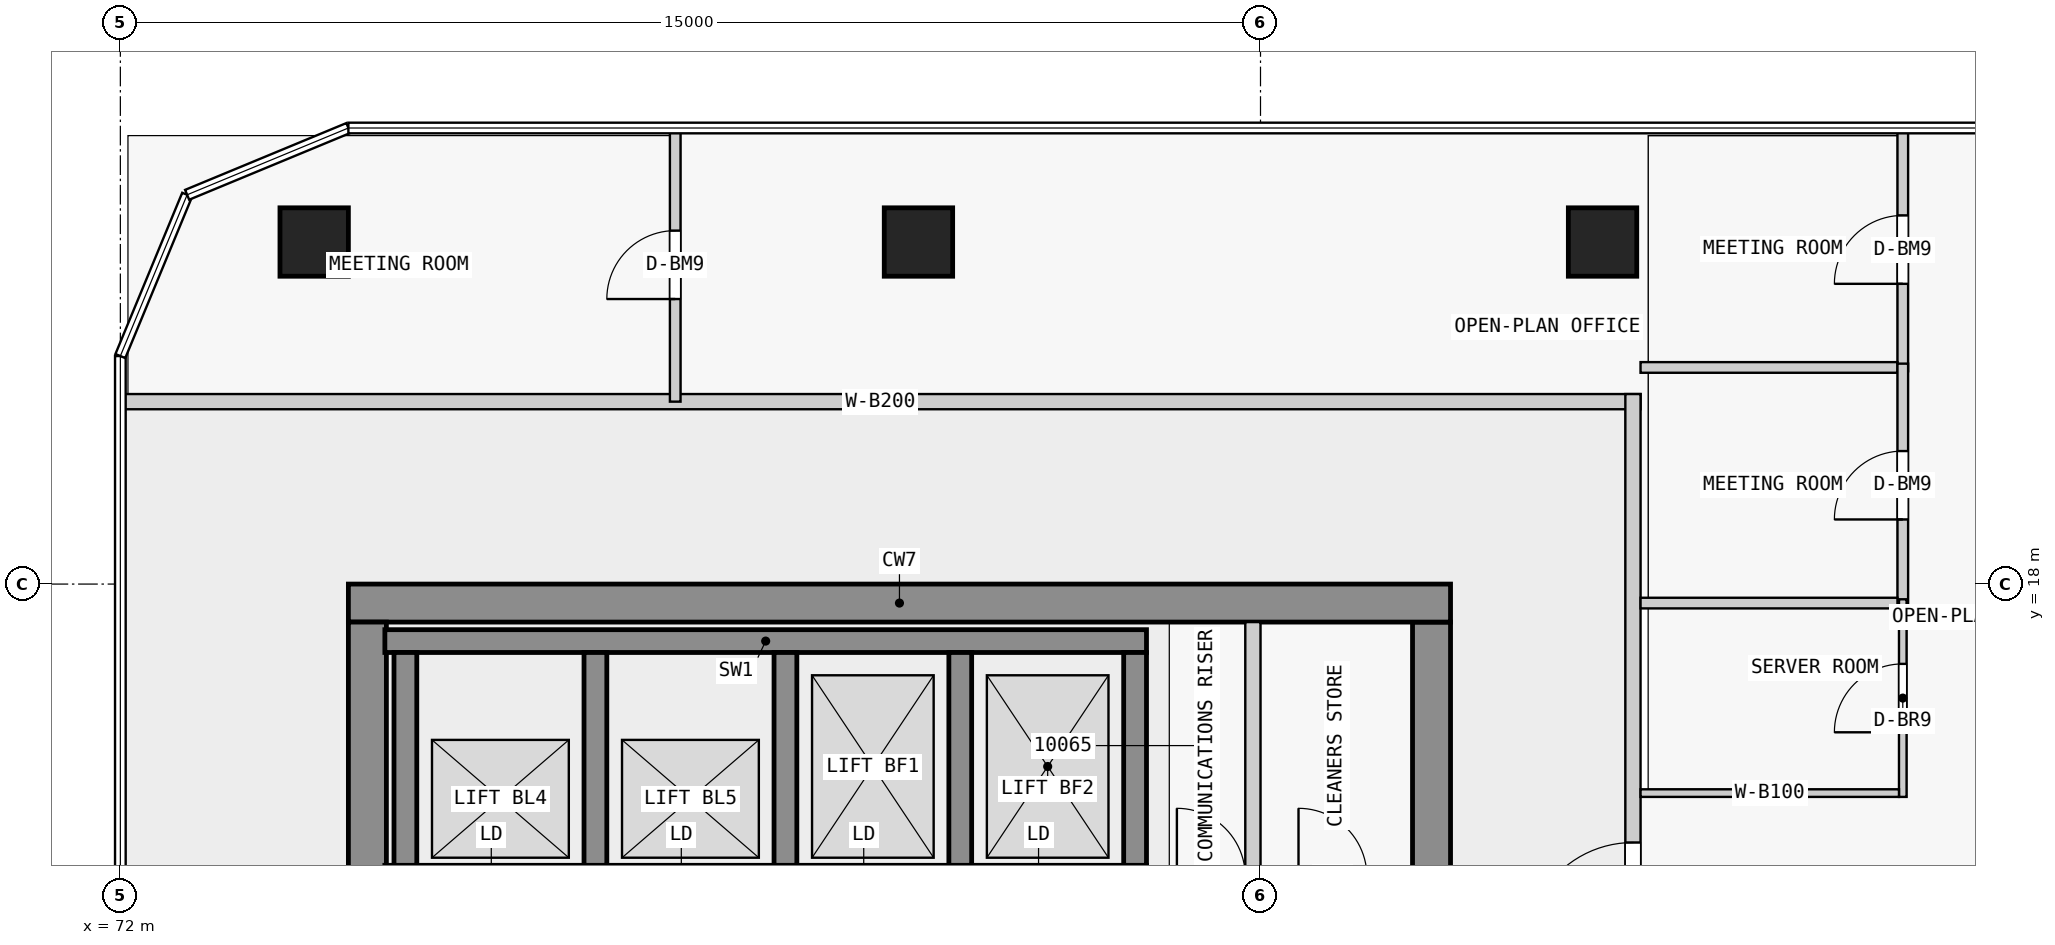
"""IFC4 building model, lengths in metres.
Left out: names, types, materials, properties, quantities, classifications, styles, units other than length and angle.
Written with IfcOpenShell. Run it as: python <this file> out.ifc"""

import sys

from ifc_helpers import new_model, si_unit, direction, frame, frame_2d, origin, origin_2d, place, context, subcontext, project, spatial, rectangle, extrude, element, fill, save


model = new_model("IFC4")
c1 = context("Model", 3, precision=1e-05, world=origin(), true_north=direction((0.0, 1.0)))
c2 = subcontext(c1, "Body", "Model", "MODEL_VIEW")
j1 = project(units=[si_unit("LENGTHUNIT", "METRE"), si_unit("PLANEANGLEUNIT", "RADIAN")], contexts=[c1])
p1 = place(None, origin())
s1 = spatial("IfcSite", under=j1, at=p1, CompositionType="ELEMENT")
p2 = place(p1, origin())
s2 = spatial("IfcBuilding", under=s1, at=p2, CompositionType="ELEMENT")
p3 = place(p2, frame((0.0, 0.0, 44.3)))
s3 = spatial("IfcBuildingStorey", under=s2, at=p3, CompositionType="ELEMENT", Elevation=44.3)
for number, where, z_axis, x_axis in (
    (1, (91.5, 22.5, 0.0), (0.0, 0.0, 1.0), (1.0, 0.0, 0.0)),
    (2, (82.5, 22.5, 0.0), (0.0, 0.0, 1.0), (1.0, 0.0, 0.0)),
    (3, (74.55, 22.5, 0.0), (0.0, 0.0, 1.0), (1.0, 0.0, 0.0)),
):
    element("IfcColumn", number, at=place(p3, frame(where, z_axis=z_axis, x_axis=x_axis)), inside=s3, PredefinedType="COLUMN", context=c2, shape_type="SweptSolid", body=[
        extrude(rectangle(XDim=0.9, YDim=0.9, at=origin_2d()), origin(), (0.0, 0.0, 1.0), 3.5),
    ])
p4 = place(p3, frame((75.0, 17.75, 0.0), z_axis=(0.0, 0.0, 1.0), x_axis=(1.0, 0.0, 0.0)))
e4 = element("IfcWall", 4, at=p4, inside=s3, PredefinedType="SHEAR", context=c2, shape_type="SweptSolid", body=[
    extrude(rectangle(XDim=14.5, YDim=0.5, at=frame_2d((7.25, 0.0))), origin(), (0.0, 0.0, 1.0), 3.25),
])
p5 = place(p3, frame((75.25, 0.5, 0.0), z_axis=(0.0, 0.0, 1.0), x_axis=(0.0, 1.0, 0.0)))
e5 = element("IfcWall", 5, at=p5, inside=s3, PredefinedType="SHEAR", context=c2, shape_type="SweptSolid", body=[
    extrude(rectangle(XDim=17.0, YDim=0.5, at=frame_2d((8.5, 0.0))), origin(), (0.0, 0.0, 1.0), 3.25),
])
p6 = place(p5, frame((7.85, 0.0, 0.0)))
e6 = element("IfcOpeningElement", 6, at=p6, cuts=e5, PredefinedType="OPENING", context=c2, shape_type="SweptSolid", body=[
    extrude(rectangle(XDim=1.8, YDim=2.1, at=frame_2d((0.9, 1.05))), frame((0.0, 0.26, 0.0), z_axis=(0.0, -1.0, 0.0), x_axis=(1.0, 0.0, 0.0)), (0.0, 0.0, 1.0), 0.52),
])
p7 = place(p3, frame((89.25, 0.5, 0.0), z_axis=(0.0, 0.0, 1.0), x_axis=(0.0, 1.0, 0.0)))
e7 = element("IfcWall", 7, at=p7, inside=s3, PredefinedType="SHEAR", context=c2, shape_type="SweptSolid", body=[
    extrude(rectangle(XDim=17.0, YDim=0.5, at=frame_2d((8.5, 0.0))), origin(), (0.0, 0.0, 1.0), 3.25),
])
p8 = place(p7, frame((7.6, 0.0, 0.0)))
e8 = element("IfcOpeningElement", 8, at=p8, cuts=e7, PredefinedType="OPENING", context=c2, shape_type="SweptSolid", body=[
    extrude(rectangle(XDim=1.8, YDim=2.1, at=frame_2d((0.9, 1.05))), frame((0.0, 0.26, 0.0), z_axis=(0.0, -1.0, 0.0), x_axis=(1.0, 0.0, 0.0)), (0.0, 0.0, 1.0), 0.52),
])
p9 = place(p3, frame((75.48, 17.25, 0.0), z_axis=(0.0, 0.0, 1.0), x_axis=(1.0, 0.0, 0.0)))
e9 = element("IfcWall", 9, at=p9, inside=s3, PredefinedType="SHEAR", context=c2, shape_type="SweptSolid", body=[
    extrude(rectangle(XDim=10.02, YDim=0.3, at=frame_2d((5.01, 0.0))), origin(), (0.0, 0.0, 1.0), 3.25),
])
for number, where, z_axis, x_axis in (
    (10, (75.75, 14.3, 0.0), (0.0, 0.0, 1.0), (0.0, 1.0, 0.0)),
    (11, (78.25, 14.3, 0.0), (0.0, 0.0, 1.0), (0.0, 1.0, 0.0)),
    (12, (80.75, 14.3, 0.0), (0.0, 0.0, 1.0), (0.0, 1.0, 0.0)),
    (13, (83.05, 14.3, 0.0), (0.0, 0.0, 1.0), (0.0, 1.0, 0.0)),
    (14, (85.35, 14.3, 0.0), (0.0, 0.0, 1.0), (0.0, 1.0, 0.0)),
):
    element("IfcWall", number, at=place(p3, frame(where, z_axis=z_axis, x_axis=x_axis)), inside=s3, PredefinedType="SHEAR", context=c2, shape_type="SweptSolid", body=[
        extrude(rectangle(XDim=2.8, YDim=0.3, at=frame_2d((1.4, 0.0))), origin(), (0.0, 0.0, 1.0), 3.25),
    ])
p10 = place(p3, frame((86.9, 14.25, 0.0), z_axis=(0.0, 0.0, 1.0), x_axis=(0.0, 1.0, 0.0)))
e15 = element("IfcWall", 15, at=p10, inside=s3, PredefinedType="PARTITIONING", context=c2, shape_type="SweptSolid", body=[
    extrude(rectangle(XDim=3.25, YDim=0.2, at=frame_2d((1.625, 0.0))), origin(), (0.0, 0.0, 1.0), 3.25),
])
p11 = place(p3, frame((72.0, 20.4, 0.0), z_axis=(0.0, 0.0, 1.0), x_axis=(1.0, 0.0, 0.0)))
e16 = element("IfcWall", 16, at=p11, inside=s3, PredefinedType="PARTITIONING", context=c2, shape_type="SweptSolid", body=[
    extrude(rectangle(XDim=20.0, YDim=0.2, at=frame_2d((10.0, 0.0))), origin(), (0.0, 0.0, 1.0), 3.25),
])
p12 = place(p3, frame((91.9, 12.2, 0.0), z_axis=(0.0, 0.0, 1.0), x_axis=(0.0, 1.0, 0.0)))
e17 = element("IfcWall", 17, at=p12, inside=s3, PredefinedType="PARTITIONING", context=c2, shape_type="SweptSolid", body=[
    extrude(rectangle(XDim=8.3, YDim=0.2, at=frame_2d((4.15, 0.0))), origin(), (0.0, 0.0, 1.0), 3.25),
])
p13 = place(p12, frame((1.0, 0.0, 0.0)))
e18 = element("IfcOpeningElement", 18, at=p13, cuts=e17, PredefinedType="OPENING", context=c2, shape_type="SweptSolid", body=[
    extrude(rectangle(XDim=1.4, YDim=2.4, at=frame_2d((0.7, 1.2))), frame((0.0, 0.11, 0.0), z_axis=(0.0, -1.0, 0.0), x_axis=(1.0, 0.0, 0.0)), (0.0, 0.0, 1.0), 0.22),
])
p14 = place(p3, frame((95.45, 20.8, 0.0), z_axis=(0.0, 0.0, 1.0), x_axis=(0.0, 1.0, 0.0)))
e19 = element("IfcWall", 19, at=p14, inside=s3, PredefinedType="PARTITIONING", context=c2, shape_type="SweptSolid", body=[
    extrude(rectangle(XDim=3.2, YDim=0.14, at=frame_2d((1.6, 0.0))), origin(), (0.0, 0.0, 1.0), 3.25),
])
p15 = place(p14, frame((1.15, 0.0, 0.0)))
e20 = element("IfcOpeningElement", 20, at=p15, cuts=e19, PredefinedType="OPENING", context=c2, shape_type="SweptSolid", body=[
    extrude(rectangle(XDim=0.9, YDim=2.4, at=frame_2d((0.45, 1.2))), frame((0.0, 0.08, 0.0), z_axis=(0.0, -1.0, 0.0), x_axis=(1.0, 0.0, 0.0)), (0.0, 0.0, 1.0), 0.16),
])
p16 = place(p3, frame((92.0, 20.85, 0.0), z_axis=(0.0, 0.0, 1.0), x_axis=(1.0, 0.0, 0.0)))
e21 = element("IfcWall", 21, at=p16, inside=s3, PredefinedType="PARTITIONING", context=c2, shape_type="SweptSolid", body=[
    extrude(rectangle(XDim=3.38, YDim=0.14, at=frame_2d((1.69, 0.0))), origin(), (0.0, 0.0, 1.0), 3.25),
])
p17 = place(p3, frame((95.45, 17.7, 0.0), z_axis=(0.0, 0.0, 1.0), x_axis=(0.0, 1.0, 0.0)))
e22 = element("IfcWall", 22, at=p17, inside=s3, PredefinedType="PARTITIONING", context=c2, shape_type="SweptSolid", body=[
    extrude(rectangle(XDim=3.2, YDim=0.14, at=frame_2d((1.6, 0.0))), origin(), (0.0, 0.0, 1.0), 3.25),
])
p18 = place(p17, frame((1.15, 0.0, 0.0)))
e23 = element("IfcOpeningElement", 23, at=p18, cuts=e22, PredefinedType="OPENING", context=c2, shape_type="SweptSolid", body=[
    extrude(rectangle(XDim=0.9, YDim=2.4, at=frame_2d((0.45, 1.2))), frame((0.0, 0.08, 0.0), z_axis=(0.0, -1.0, 0.0), x_axis=(1.0, 0.0, 0.0)), (0.0, 0.0, 1.0), 0.16),
])
p19 = place(p3, frame((92.0, 17.75, 0.0), z_axis=(0.0, 0.0, 1.0), x_axis=(1.0, 0.0, 0.0)))
e24 = element("IfcWall", 24, at=p19, inside=s3, PredefinedType="PARTITIONING", context=c2, shape_type="SweptSolid", body=[
    extrude(rectangle(XDim=3.38, YDim=0.14, at=frame_2d((1.69, 0.0))), origin(), (0.0, 0.0, 1.0), 3.25),
])
p20 = place(p3, frame((95.45, 15.2, 0.0), z_axis=(0.0, 0.0, 1.0), x_axis=(0.0, 1.0, 0.0)))
e25 = element("IfcWall", 25, at=p20, inside=s3, PredefinedType="PARTITIONING", context=c2, shape_type="SweptSolid", body=[
    extrude(rectangle(XDim=2.6, YDim=0.1, at=frame_2d((1.3, 0.0))), origin(), (0.0, 0.0, 1.0), 3.25),
])
p21 = place(p20, frame((0.85, 0.0, 0.0)))
e26 = element("IfcOpeningElement", 26, at=p21, cuts=e25, PredefinedType="OPENING", context=c2, shape_type="SweptSolid", body=[
    extrude(rectangle(XDim=0.9, YDim=2.1, at=frame_2d((0.45, 1.05))), frame((0.0, 0.06, 0.0), z_axis=(0.0, -1.0, 0.0), x_axis=(1.0, 0.0, 0.0)), (0.0, 0.0, 1.0), 0.12),
])
p22 = place(p3, frame((92.0, 15.25, 0.0), z_axis=(0.0, 0.0, 1.0), x_axis=(1.0, 0.0, 0.0)))
e27 = element("IfcWall", 27, at=p22, inside=s3, PredefinedType="PARTITIONING", context=c2, shape_type="SweptSolid", body=[
    extrude(rectangle(XDim=3.4, YDim=0.1, at=frame_2d((1.7, 0.0))), origin(), (0.0, 0.0, 1.0), 3.25),
])
p23 = place(p3, frame((79.3, 20.4, 0.0), z_axis=(0.0, 0.0, 1.0), x_axis=(0.0, 1.0, 0.0)))
e28 = element("IfcWall", 28, at=p23, inside=s3, PredefinedType="PARTITIONING", context=c2, shape_type="SweptSolid", body=[
    extrude(rectangle(XDim=3.6, YDim=0.14, at=frame_2d((1.8, 0.0))), origin(), (0.0, 0.0, 1.0), 3.25),
])
p24 = place(p23, frame((1.35, 0.0, 0.0)))
e29 = element("IfcOpeningElement", 29, at=p24, cuts=e28, PredefinedType="OPENING", context=c2, shape_type="SweptSolid", body=[
    extrude(rectangle(XDim=0.9, YDim=2.4, at=frame_2d((0.45, 1.2))), frame((0.0, 0.08, 0.0), z_axis=(0.0, -1.0, 0.0), x_axis=(1.0, 0.0, 0.0)), (0.0, 0.0, 1.0), 0.16),
])
p25 = place(p13, origin())
e30 = element("IfcDoor", 30, at=p25, inside=s3, OperationType="DOUBLE_DOOR_SINGLE_SWING", PredefinedType="DOOR", context=c2, shape_type="SweptSolid", body=[
    extrude(rectangle(XDim=1.4, YDim=2.4, at=frame_2d((0.7, 1.2))), frame((0.0, 0.025, 0.0), z_axis=(0.0, -1.0, 0.0), x_axis=(1.0, 0.0, 0.0)), (0.0, 0.0, 1.0), 0.05),
])
fill(e18, e30)
p26 = place(p15, origin())
e31 = element("IfcDoor", 31, at=p26, inside=s3, OperationType="SINGLE_SWING_LEFT", PredefinedType="DOOR", context=c2, shape_type="SweptSolid", body=[
    extrude(rectangle(XDim=0.9, YDim=2.4, at=frame_2d((0.45, 1.2))), frame((0.0, 0.025, 0.0), z_axis=(0.0, -1.0, 0.0), x_axis=(1.0, 0.0, 0.0)), (0.0, 0.0, 1.0), 0.05),
])
fill(e20, e31)
p27 = place(p18, origin())
e32 = element("IfcDoor", 32, at=p27, inside=s3, OperationType="SINGLE_SWING_LEFT", PredefinedType="DOOR", context=c2, shape_type="SweptSolid", body=[
    extrude(rectangle(XDim=0.9, YDim=2.4, at=frame_2d((0.45, 1.2))), frame((0.0, 0.025, 0.0), z_axis=(0.0, -1.0, 0.0), x_axis=(1.0, 0.0, 0.0)), (0.0, 0.0, 1.0), 0.05),
])
fill(e23, e32)
p28 = place(p21, origin())
e33 = element("IfcDoor", 33, at=p28, inside=s3, OperationType="SINGLE_SWING_LEFT", PredefinedType="DOOR", context=c2, shape_type="SweptSolid", body=[
    extrude(rectangle(XDim=0.9, YDim=2.1, at=frame_2d((0.45, 1.05))), frame((0.0, 0.025, 0.0), z_axis=(0.0, -1.0, 0.0), x_axis=(1.0, 0.0, 0.0)), (0.0, 0.0, 1.0), 0.05),
])
fill(e26, e33)
p29 = place(p24, origin())
e34 = element("IfcDoor", 34, at=p29, inside=s3, OperationType="SINGLE_SWING_LEFT", PredefinedType="DOOR", context=c2, shape_type="SweptSolid", body=[
    extrude(rectangle(XDim=0.9, YDim=2.4, at=frame_2d((0.45, 1.2))), frame((0.0, 0.025, 0.0), z_axis=(0.0, -1.0, 0.0), x_axis=(1.0, 0.0, 0.0)), (0.0, 0.0, 1.0), 0.05),
])
fill(e29, e34)
save(model, sys.argv[1])
